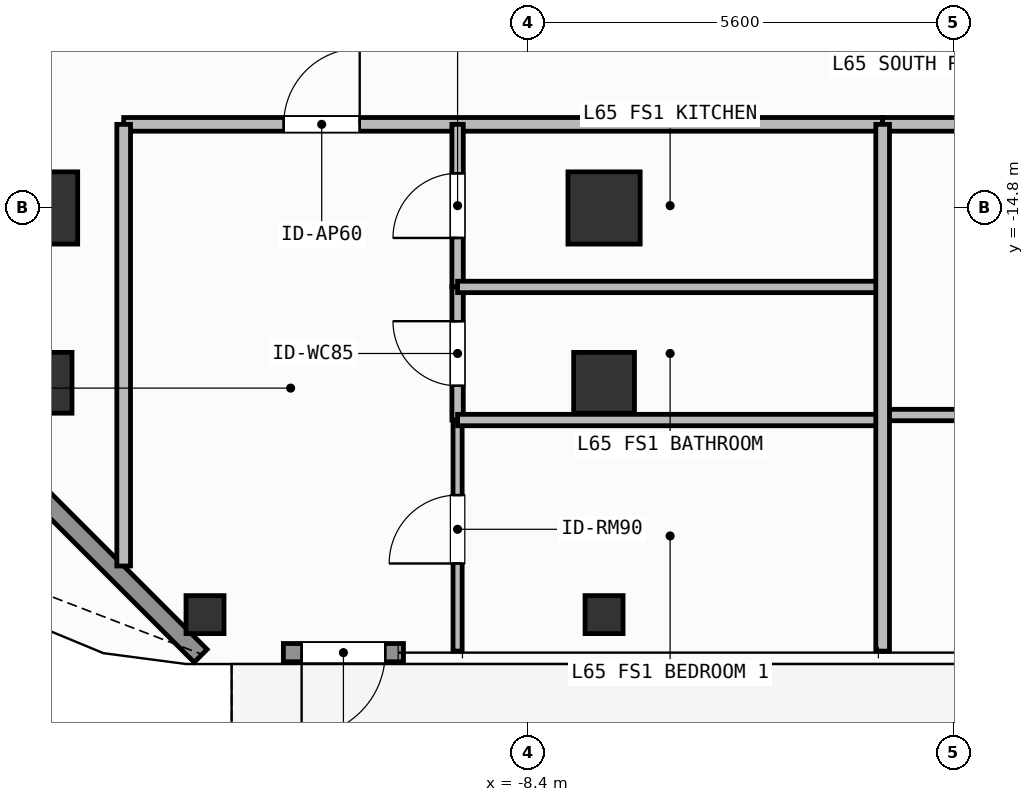
"""IFC4 building model, lengths in metres.
Left out: names, types, materials, properties, quantities, classifications, styles, units other than length and angle.
Written with IfcOpenShell. Run it as: python <this file> out.ifc"""

import sys

from ifc_helpers import new_model, si_unit, direction, frame, frame_2d, origin, origin_2d, place, context, subcontext, project, spatial, rectangle, hollow_rectangle, extrude, element, fill, save


model = new_model("IFC4")
c1 = context("Model", 3, precision=1e-05, world=origin(), true_north=direction((0.0, 1.0)))
c2 = subcontext(c1, "Body", "Model", "MODEL_VIEW")
j1 = project(units=[si_unit("LENGTHUNIT", "METRE"), si_unit("PLANEANGLEUNIT", "RADIAN")], contexts=[c1])
p1 = place(None, origin())
s1 = spatial("IfcSite", under=j1, at=p1, CompositionType="ELEMENT")
p2 = place(p1, origin())
s2 = spatial("IfcBuilding", under=s1, at=p2, CompositionType="ELEMENT")
p3 = place(p2, frame((0.0, 0.0, 266.4)))
s3 = spatial("IfcBuildingStorey", under=s2, at=p3, CompositionType="ELEMENT", Elevation=266.4)
for number, where, z_axis, x_axis in (
    (1, (-14.8, -14.8, 0.0), (0.0, 0.0, 1.0), (1.0, 0.0, 0.0)),
    (2, (-7.4, -14.8, 0.0), (0.0, 0.0, 1.0), (1.0, 0.0, 0.0)),
):
    element("IfcColumn", number, at=place(p3, frame(where, z_axis=z_axis, x_axis=x_axis)), inside=s3, PredefinedType="COLUMN", context=c2, shape_type="SweptSolid", body=[
        extrude(rectangle(XDim=0.95, YDim=0.95, at=origin_2d()), origin(), (0.0, 0.0, 1.0), 3.9),
    ])
for number, where, z_axis, x_axis in (
    (3, (-14.8, -17.1, 0.0), (0.0, 0.0, 1.0), (1.0, 0.0, 0.0)),
    (4, (-7.4, -17.1, 0.0), (0.0, 0.0, 1.0), (1.0, 0.0, 0.0)),
):
    element("IfcColumn", number, at=place(p3, frame(where, z_axis=z_axis, x_axis=x_axis)), inside=s3, PredefinedType="COLUMN", context=c2, shape_type="SweptSolid", body=[
        extrude(hollow_rectangle(XDim=0.8, YDim=0.8, WallThickness=0.036, at=origin_2d()), origin(), (0.0, 0.0, 1.0), 3.9),
    ])
for number, where, z_axis, x_axis in (
    (5, (-12.65, -20.15, 0.0), (0.0, 0.0, 1.0), (1.0, 0.0, 0.0)),
    (6, (-7.4, -20.15, 0.0), (0.0, 0.0, 1.0), (1.0, 0.0, 0.0)),
):
    element("IfcColumn", number, at=place(p3, frame(where, z_axis=z_axis, x_axis=x_axis)), inside=s3, PredefinedType="COLUMN", context=c2, shape_type="SweptSolid", body=[
        extrude(hollow_rectangle(XDim=0.5, YDim=0.5, WallThickness=0.025, at=origin_2d()), origin(), (0.0, 0.0, 1.0), 3.9),
    ])
p4 = place(p3, frame((-10.039, -20.65, 0.0), z_axis=(0.0, 0.0, 1.0), x_axis=(-1.0, 0.0, 0.0)))
e7 = element("IfcWall", 7, at=p4, inside=s3, PredefinedType="SOLIDWALL", context=c2, shape_type="SweptSolid", body=[
    extrude(rectangle(XDim=1.58, YDim=0.24, at=frame_2d((0.79, 0.0))), origin(), (0.0, 0.0, 1.0), 3.68),
])
p5 = place(p4, frame((0.24, 0.0, 0.0)))
e8 = element("IfcOpeningElement", 8, at=p5, cuts=e7, PredefinedType="OPENING", context=c2, shape_type="SweptSolid", body=[
    extrude(rectangle(XDim=1.1, YDim=2.2, at=frame_2d((0.55, 1.1))), frame((0.0, 0.13, 0.0), z_axis=(0.0, -1.0, 0.0), x_axis=(1.0, 0.0, 0.0)), (0.0, 0.0, 1.0), 0.26),
])
p6 = place(p3, frame((-12.708, -20.692, 0.0), z_axis=(0.0, 0.0, 1.0), x_axis=(-0.707126925818, 0.707086635981, 0.0)))
e9 = element("IfcWall", 9, at=p6, inside=s3, PredefinedType="SOLIDWALL", context=c2, shape_type="SweptSolid", body=[
    extrude(rectangle(XDim=6.06, YDim=0.24, at=frame_2d((3.03, 0.0))), origin(), (0.0, 0.0, 1.0), 3.68),
])
p7 = place(p3, frame((-13.72, -13.7, 0.0), z_axis=(0.0, 0.0, 1.0), x_axis=(1.0, 0.0, 0.0)))
e10 = element("IfcWall", 10, at=p7, inside=s3, PredefinedType="PARTITIONING", context=c2, shape_type="SweptSolid", body=[
    extrude(rectangle(XDim=9.985, YDim=0.18, at=frame_2d((4.992, 0.0))), origin(), (0.0, 0.0, 1.0), 3.68),
])
p8 = place(p7, frame((2.105, 0.0, 0.0)))
e11 = element("IfcOpeningElement", 11, at=p8, cuts=e10, PredefinedType="OPENING", context=c2, shape_type="SweptSolid", body=[
    extrude(rectangle(XDim=1.0, YDim=2.2, at=frame_2d((0.5, 1.1))), frame((0.0, 0.1, 0.0), z_axis=(0.0, -1.0, 0.0), x_axis=(1.0, 0.0, 0.0)), (0.0, 0.0, 1.0), 0.2),
])
p9 = place(p3, frame((-9.327, -15.839, 0.0), z_axis=(0.0, 0.0, 1.0), x_axis=(0.0, 1.0, 0.0)))
e12 = element("IfcWall", 12, at=p9, inside=s3, PredefinedType="PARTITIONING", context=c2, shape_type="SweptSolid", body=[
    extrude(rectangle(XDim=2.139, YDim=0.15, at=frame_2d((1.07, 0.0))), origin(), (0.0, 0.0, 1.0), 3.68),
])
p10 = place(p9, frame((0.645, 0.0, 0.0)))
e13 = element("IfcOpeningElement", 13, at=p10, cuts=e12, PredefinedType="OPENING", context=c2, shape_type="SweptSolid", body=[
    extrude(rectangle(XDim=0.85, YDim=2.1, at=frame_2d((0.425, 1.05))), frame((0.0, 0.085, 0.0), z_axis=(0.0, -1.0, 0.0), x_axis=(1.0, 0.0, 0.0)), (0.0, 0.0, 1.0), 0.17),
])
p11 = place(p3, frame((-9.327, -17.59, 0.0), z_axis=(0.0, 0.0, 1.0), x_axis=(0.0, 1.0, 0.0)))
e14 = element("IfcWall", 14, at=p11, inside=s3, PredefinedType="PARTITIONING", context=c2, shape_type="SweptSolid", body=[
    extrude(rectangle(XDim=1.751, YDim=0.15, at=frame_2d((0.875, 0.0))), origin(), (0.0, 0.0, 1.0), 3.68),
])
p12 = place(p11, frame((0.45, 0.0, 0.0)))
e15 = element("IfcOpeningElement", 15, at=p12, cuts=e14, PredefinedType="OPENING", context=c2, shape_type="SweptSolid", body=[
    extrude(rectangle(XDim=0.85, YDim=2.1, at=frame_2d((0.425, 1.05))), frame((0.0, 0.085, 0.0), z_axis=(0.0, -1.0, 0.0), x_axis=(1.0, 0.0, 0.0)), (0.0, 0.0, 1.0), 0.17),
])
p13 = place(p3, frame((-9.327, -20.63, 0.0), z_axis=(0.0, 0.0, 1.0), x_axis=(0.0, 1.0, 0.0)))
e16 = element("IfcWall", 16, at=p13, inside=s3, PredefinedType="PARTITIONING", context=c2, shape_type="SweptSolid", body=[
    extrude(rectangle(XDim=3.04, YDim=0.12, at=frame_2d((1.52, 0.0))), origin(), (0.0, 0.0, 1.0), 3.68),
])
p14 = place(p13, frame((1.153, 0.0, 0.0)))
e17 = element("IfcOpeningElement", 17, at=p14, cuts=e16, PredefinedType="OPENING", context=c2, shape_type="SweptSolid", body=[
    extrude(rectangle(XDim=0.9, YDim=2.1, at=frame_2d((0.45, 1.05))), frame((0.0, 0.07, 0.0), z_axis=(0.0, -1.0, 0.0), x_axis=(1.0, 0.0, 0.0)), (0.0, 0.0, 1.0), 0.14),
])
p15 = place(p3, frame((-3.735, -13.7, 0.0), z_axis=(0.0, 0.0, 1.0), x_axis=(1.0, 0.0, 0.0)))
e18 = element("IfcWall", 18, at=p15, inside=s3, PredefinedType="PARTITIONING", context=c2, shape_type="SweptSolid", body=[
    extrude(rectangle(XDim=14.301, YDim=0.18, at=frame_2d((7.15, 0.0))), origin(), (0.0, 0.0, 1.0), 3.68),
])
p16 = place(p15, frame((6.917, 0.0, 0.0)))
e19 = element("IfcOpeningElement", 19, at=p16, cuts=e18, PredefinedType="OPENING", context=c2, shape_type="SweptSolid", body=[
    extrude(rectangle(XDim=1.0, YDim=2.2, at=frame_2d((0.5, 1.1))), frame((0.0, 0.1, 0.0), z_axis=(0.0, -1.0, 0.0), x_axis=(1.0, 0.0, 0.0)), (0.0, 0.0, 1.0), 0.2),
])
p17 = place(p3, frame((-13.72, -19.51, 0.0), z_axis=(0.0, 0.0, 1.0), x_axis=(0.0, 1.0, 0.0)))
e20 = element("IfcWall", 20, at=p17, inside=s3, PredefinedType="PARTITIONING", context=c2, shape_type="SweptSolid", body=[
    extrude(rectangle(XDim=5.81, YDim=0.18, at=frame_2d((2.905, 0.0))), origin(), (0.0, 0.0, 1.0), 3.68),
])
for number, where, z_axis, x_axis in (
    (21, (-9.327, -15.839, 0.0), (0.0, 0.0, 1.0), (1.0, 0.0, 0.0)),
    (22, (-9.327, -17.59, 0.0), (0.0, 0.0, 1.0), (1.0, 0.0, 0.0)),
):
    element("IfcWall", number, at=place(p3, frame(where, z_axis=z_axis, x_axis=x_axis)), inside=s3, PredefinedType="PARTITIONING", context=c2, shape_type="SweptSolid", body=[
        extrude(rectangle(XDim=5.592, YDim=0.15, at=frame_2d((2.796, 0.0))), origin(), (0.0, 0.0, 1.0), 3.68),
    ])
p18 = place(p3, frame((-3.735, -17.524, 0.0), z_axis=(0.0, 0.0, 1.0), x_axis=(1.0, 0.0, 0.0)))
e23 = element("IfcWall", 23, at=p18, inside=s3, PredefinedType="PARTITIONING", context=c2, shape_type="SweptSolid", body=[
    extrude(rectangle(XDim=5.72, YDim=0.15, at=frame_2d((2.86, 0.0))), origin(), (0.0, 0.0, 1.0), 3.68),
])
p19 = place(p3, frame((-3.735, -20.63, 0.0), z_axis=(0.0, 0.0, 1.0), x_axis=(0.0, 1.0, 0.0)))
e24 = element("IfcWall", 24, at=p19, inside=s3, PredefinedType="PARTITIONING", context=c2, shape_type="SweptSolid", body=[
    extrude(rectangle(XDim=6.93, YDim=0.18, at=frame_2d((3.465, 0.0))), origin(), (0.0, 0.0, 1.0), 3.68),
])
p20 = place(p5, origin())
e25 = element("IfcDoor", 25, at=p20, inside=s3, OperationType="SINGLE_SWING_RIGHT", PredefinedType="DOOR", context=c2, shape_type="SweptSolid", body=[
    extrude(rectangle(XDim=1.1, YDim=2.2, at=frame_2d((0.55, 1.1))), frame((0.0, 0.025, 0.0), z_axis=(0.0, -1.0, 0.0), x_axis=(1.0, 0.0, 0.0)), (0.0, 0.0, 1.0), 0.05),
])
fill(e8, e25)
p21 = place(p8, origin())
e26 = element("IfcDoor", 26, at=p21, inside=s3, OperationType="SINGLE_SWING_RIGHT", PredefinedType="DOOR", context=c2, shape_type="SweptSolid", body=[
    extrude(rectangle(XDim=1.0, YDim=2.2, at=frame_2d((0.5, 1.1))), frame((0.0, 0.025, 0.0), z_axis=(0.0, -1.0, 0.0), x_axis=(1.0, 0.0, 0.0)), (0.0, 0.0, 1.0), 0.05),
])
fill(e11, e26)
p22 = place(p10, origin())
e27 = element("IfcDoor", 27, at=p22, inside=s3, OperationType="SINGLE_SWING_LEFT", PredefinedType="DOOR", context=c2, shape_type="SweptSolid", body=[
    extrude(rectangle(XDim=0.85, YDim=2.1, at=frame_2d((0.425, 1.05))), frame((0.0, 0.025, 0.0), z_axis=(0.0, -1.0, 0.0), x_axis=(1.0, 0.0, 0.0)), (0.0, 0.0, 1.0), 0.05),
])
fill(e13, e27)
p23 = place(p12, origin())
e28 = element("IfcDoor", 28, at=p23, inside=s3, OperationType="SINGLE_SWING_RIGHT", PredefinedType="DOOR", context=c2, shape_type="SweptSolid", body=[
    extrude(rectangle(XDim=0.85, YDim=2.1, at=frame_2d((0.425, 1.05))), frame((0.0, 0.025, 0.0), z_axis=(0.0, -1.0, 0.0), x_axis=(1.0, 0.0, 0.0)), (0.0, 0.0, 1.0), 0.05),
])
fill(e15, e28)
p24 = place(p14, origin())
e29 = element("IfcDoor", 29, at=p24, inside=s3, OperationType="SINGLE_SWING_LEFT", PredefinedType="DOOR", context=c2, shape_type="SweptSolid", body=[
    extrude(rectangle(XDim=0.9, YDim=2.1, at=frame_2d((0.45, 1.05))), frame((0.0, 0.025, 0.0), z_axis=(0.0, -1.0, 0.0), x_axis=(1.0, 0.0, 0.0)), (0.0, 0.0, 1.0), 0.05),
])
fill(e17, e29)
save(model, sys.argv[1])
